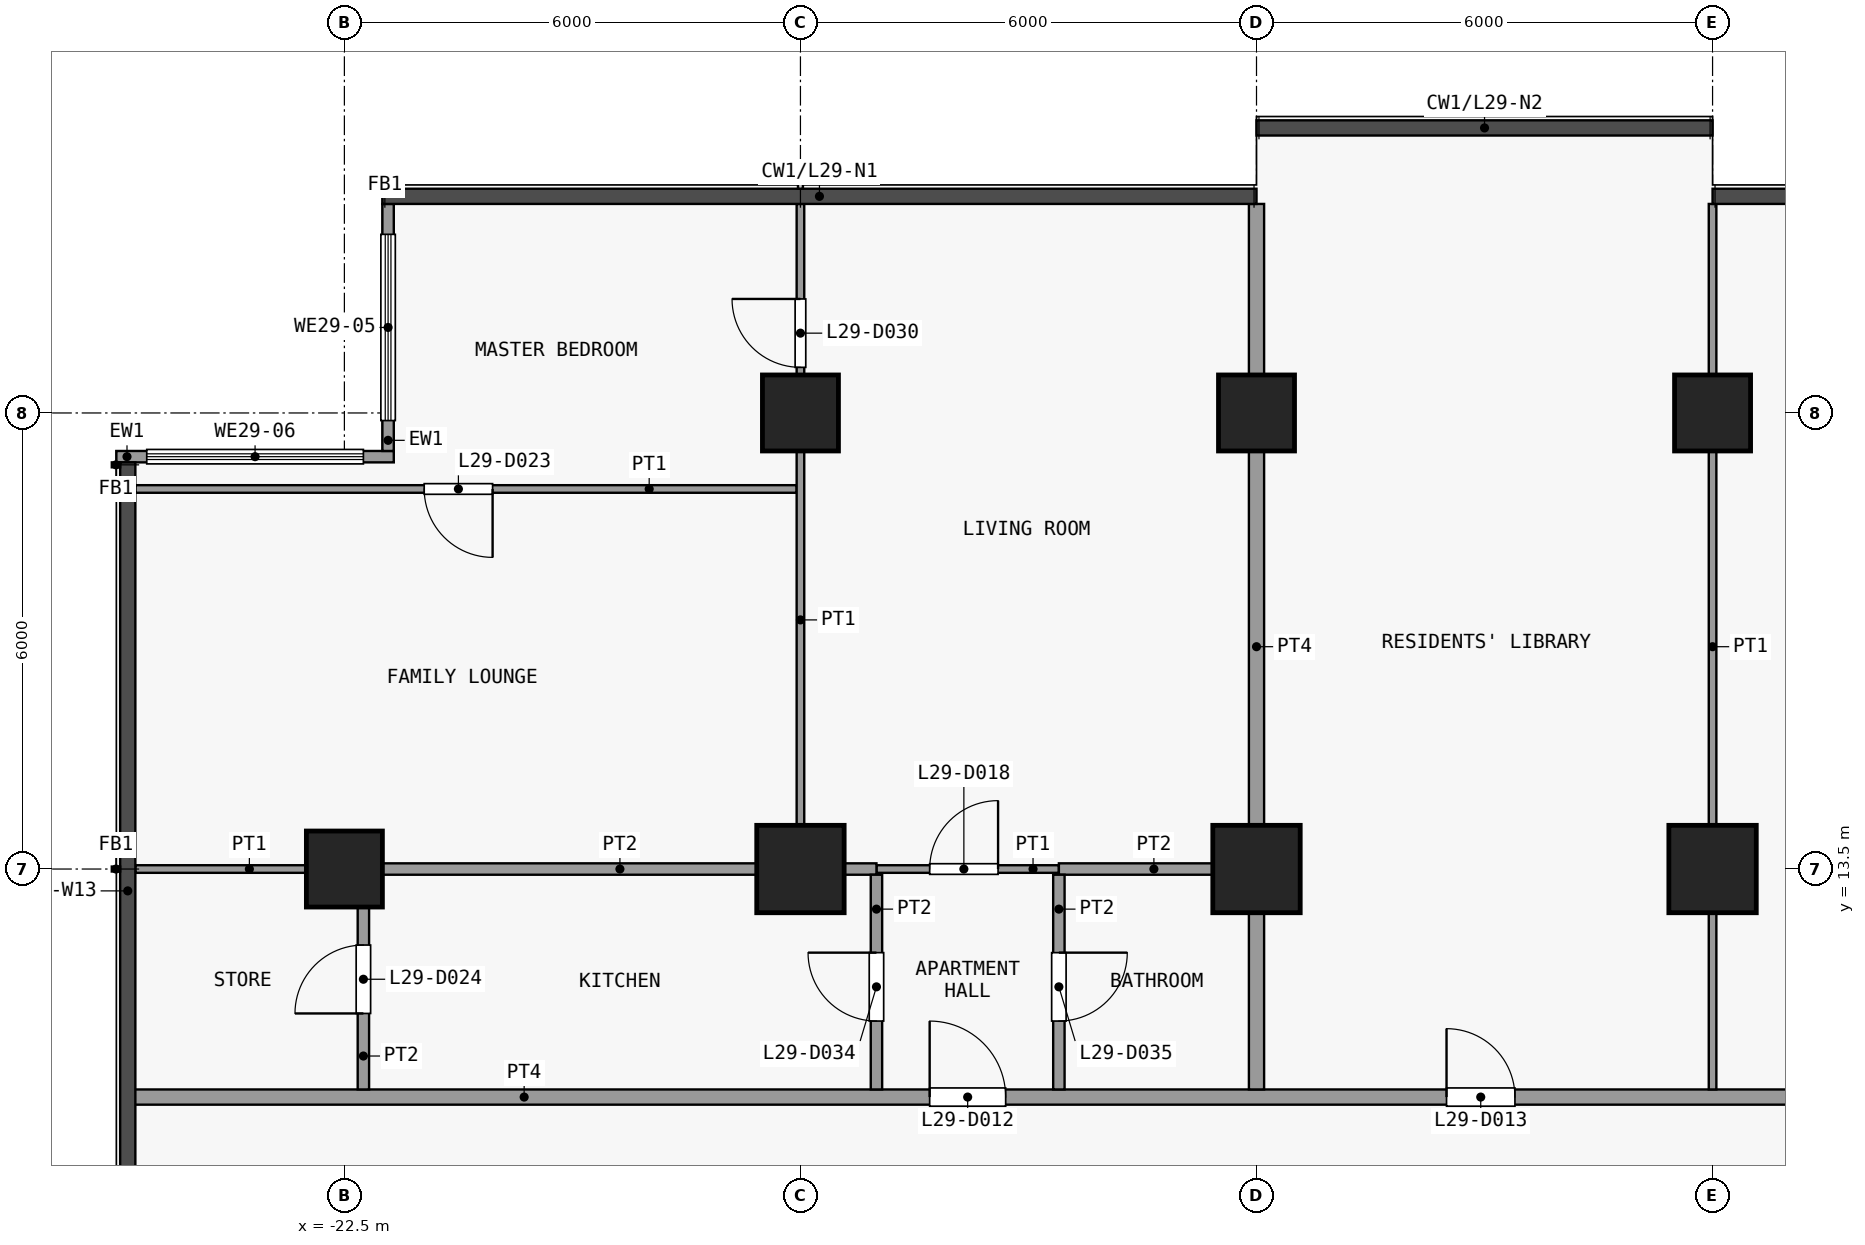
"""IFC4 building model, lengths in metres.
Left out: names, types, materials, properties, quantities, classifications, styles, units other than length and angle.
Written with IfcOpenShell. Run it as: python <this file> out.ifc"""

import sys

from ifc_helpers import new_model, si_unit, direction, frame, frame_2d, origin, origin_2d, place, context, subcontext, project, spatial, rectangle, extrude, element, fill, save


model = new_model("IFC4")
c1 = context("Model", 3, precision=1e-05, world=origin(), true_north=direction((0.0, 1.0)))
c2 = subcontext(c1, "Body", "Model", "MODEL_VIEW")
j1 = project(units=[si_unit("LENGTHUNIT", "METRE"), si_unit("PLANEANGLEUNIT", "RADIAN")], contexts=[c1])
p1 = place(None, origin())
s1 = spatial("IfcSite", under=j1, at=p1, CompositionType="ELEMENT")
p2 = place(p1, origin())
s2 = spatial("IfcBuilding", under=s1, at=p2, CompositionType="ELEMENT")
p3 = place(p2, frame((0.0, 0.0, 117.1)))
s3 = spatial("IfcBuildingStorey", under=s2, at=p3, CompositionType="ELEMENT", Elevation=117.1)
p4 = place(p3, frame((-22.5, 13.5, 0.0), z_axis=(0.0, 0.0, 1.0), x_axis=(1.0, 0.0, 0.0)))
e1 = element("IfcColumn", 1, at=p4, inside=s3, PredefinedType="COLUMN", context=c2, shape_type="SweptSolid", body=[
    extrude(rectangle(XDim=1.0, YDim=1.0, at=origin_2d()), origin(), (0.0, 0.0, 1.0), 3.6),
])
p5 = place(p3, frame((-16.5, 13.5, 0.0), z_axis=(0.0, 0.0, 1.0), x_axis=(1.0, 0.0, 0.0)))
e2 = element("IfcColumn", 2, at=p5, inside=s3, PredefinedType="COLUMN", context=c2, shape_type="SweptSolid", body=[
    extrude(rectangle(XDim=1.15, YDim=1.15, at=origin_2d()), origin(), (0.0, 0.0, 1.0), 3.6),
])
p6 = place(p3, frame((-16.5, 19.5, 0.0), z_axis=(0.0, 0.0, 1.0), x_axis=(1.0, 0.0, 0.0)))
e3 = element("IfcColumn", 3, at=p6, inside=s3, PredefinedType="COLUMN", context=c2, shape_type="SweptSolid", body=[
    extrude(rectangle(XDim=1.0, YDim=1.0, at=origin_2d()), origin(), (0.0, 0.0, 1.0), 3.6),
])
p7 = place(p3, frame((-10.5, 13.5, 0.0), z_axis=(0.0, 0.0, 1.0), x_axis=(1.0, 0.0, 0.0)))
e4 = element("IfcColumn", 4, at=p7, inside=s3, PredefinedType="COLUMN", context=c2, shape_type="SweptSolid", body=[
    extrude(rectangle(XDim=1.15, YDim=1.15, at=origin_2d()), origin(), (0.0, 0.0, 1.0), 3.6),
])
p8 = place(p3, frame((-10.5, 19.5, 0.0), z_axis=(0.0, 0.0, 1.0), x_axis=(1.0, 0.0, 0.0)))
e5 = element("IfcColumn", 5, at=p8, inside=s3, PredefinedType="COLUMN", context=c2, shape_type="SweptSolid", body=[
    extrude(rectangle(XDim=1.0, YDim=1.0, at=origin_2d()), origin(), (0.0, 0.0, 1.0), 3.6),
])
p9 = place(p3, frame((-4.5, 13.5, 0.0), z_axis=(0.0, 0.0, 1.0), x_axis=(1.0, 0.0, 0.0)))
e6 = element("IfcColumn", 6, at=p9, inside=s3, PredefinedType="COLUMN", context=c2, shape_type="SweptSolid", body=[
    extrude(rectangle(XDim=1.15, YDim=1.15, at=origin_2d()), origin(), (0.0, 0.0, 1.0), 3.6),
])
p10 = place(p3, frame((-4.5, 19.5, 0.0), z_axis=(0.0, 0.0, 1.0), x_axis=(1.0, 0.0, 0.0)))
e7 = element("IfcColumn", 7, at=p10, inside=s3, PredefinedType="COLUMN", context=c2, shape_type="SweptSolid", body=[
    extrude(rectangle(XDim=1.0, YDim=1.0, at=origin_2d()), origin(), (0.0, 0.0, 1.0), 3.6),
])
p11 = place(p3, frame((-21.925, 19.0, 0.0), z_axis=(0.0, 0.0, 1.0), x_axis=(0.0, 1.0, 0.0)))
e8 = element("IfcWall", 8, at=p11, inside=s3, PredefinedType="SOLIDWALL", context=c2, shape_type="SweptSolid", body=[
    extrude(rectangle(XDim=3.25, YDim=0.15, at=frame_2d((1.625, 0.0))), origin(), (0.0, 0.0, 1.0), 3.3),
])
p12 = place(p11, frame((0.4, 0.0, 0.9)))
e9 = element("IfcOpeningElement", 9, at=p12, cuts=e8, PredefinedType="OPENING", context=c2, shape_type="SweptSolid", body=[
    extrude(rectangle(XDim=2.45, YDim=2.4, at=frame_2d((1.225, 1.2))), frame((0.0, 0.085, 0.0), z_axis=(0.0, -1.0, 0.0), x_axis=(1.0, 0.0, 0.0)), (0.0, 0.0, 1.0), 0.17),
])
p13 = place(p3, frame((-25.5, 18.925, 0.0), z_axis=(0.0, 0.0, 1.0), x_axis=(1.0, 0.0, 0.0)))
e10 = element("IfcWall", 10, at=p13, inside=s3, PredefinedType="SOLIDWALL", context=c2, shape_type="SweptSolid", body=[
    extrude(rectangle(XDim=3.65, YDim=0.15, at=frame_2d((1.825, 0.0))), origin(), (0.0, 0.0, 1.0), 3.3),
])
p14 = place(p13, frame((0.4, 0.0, 0.9)))
e11 = element("IfcOpeningElement", 11, at=p14, cuts=e10, PredefinedType="OPENING", context=c2, shape_type="SweptSolid", body=[
    extrude(rectangle(XDim=2.85, YDim=2.4, at=frame_2d((1.425, 1.2))), frame((0.0, 0.085, 0.0), z_axis=(0.0, -1.0, 0.0), x_axis=(1.0, 0.0, 0.0)), (0.0, 0.0, 1.0), 0.17),
])
p15 = place(p3, frame((-25.35, 10.5, 0.0), z_axis=(0.0, 0.0, 1.0), x_axis=(1.0, 0.0, 0.0)))
e12 = element("IfcWall", 12, at=p15, inside=s3, PredefinedType="PARTITIONING", context=c2, shape_type="SweptSolid", body=[
    extrude(rectangle(XDim=50.7, YDim=0.2, at=frame_2d((25.35, 0.0))), origin(), (0.0, 0.0, 1.0), 3.3),
])
p16 = place(p15, frame((10.55, 0.0, 0.0)))
e13 = element("IfcOpeningElement", 13, at=p16, cuts=e12, PredefinedType="OPENING", context=c2, shape_type="SweptSolid", body=[
    extrude(rectangle(XDim=1.0, YDim=2.1, at=frame_2d((0.5, 1.05))), frame((0.0, 0.11, 0.0), z_axis=(0.0, -1.0, 0.0), x_axis=(1.0, 0.0, 0.0)), (0.0, 0.0, 1.0), 0.22),
])
p17 = place(p15, frame((17.35, 0.0, 0.0)))
e14 = element("IfcOpeningElement", 14, at=p17, cuts=e12, PredefinedType="OPENING", context=c2, shape_type="SweptSolid", body=[
    extrude(rectangle(XDim=0.9, YDim=2.1, at=frame_2d((0.45, 1.05))), frame((0.0, 0.11, 0.0), z_axis=(0.0, -1.0, 0.0), x_axis=(1.0, 0.0, 0.0)), (0.0, 0.0, 1.0), 0.22),
])
p18 = place(p15, frame((24.85, 0.0, 0.0)))
e15 = element("IfcOpeningElement", 15, at=p18, cuts=e12, PredefinedType="OPENING", context=c2, shape_type="SweptSolid", body=[
    extrude(rectangle(XDim=0.9, YDim=2.1, at=frame_2d((0.45, 1.05))), frame((0.0, 0.11, 0.0), z_axis=(0.0, -1.0, 0.0), x_axis=(1.0, 0.0, 0.0)), (0.0, 0.0, 1.0), 0.22),
])
p19 = place(p15, frame((32.35, 0.0, 0.0)))
e16 = element("IfcOpeningElement", 16, at=p19, cuts=e12, PredefinedType="OPENING", context=c2, shape_type="SweptSolid", body=[
    extrude(rectangle(XDim=0.9, YDim=2.1, at=frame_2d((0.45, 1.05))), frame((0.0, 0.11, 0.0), z_axis=(0.0, -1.0, 0.0), x_axis=(1.0, 0.0, 0.0)), (0.0, 0.0, 1.0), 0.22),
])
p20 = place(p15, frame((36.55, 0.0, 0.0)))
e17 = element("IfcOpeningElement", 17, at=p20, cuts=e12, PredefinedType="OPENING", context=c2, shape_type="SweptSolid", body=[
    extrude(rectangle(XDim=1.0, YDim=2.1, at=frame_2d((0.5, 1.05))), frame((0.0, 0.11, 0.0), z_axis=(0.0, -1.0, 0.0), x_axis=(1.0, 0.0, 0.0)), (0.0, 0.0, 1.0), 0.22),
])
p21 = place(p15, frame((45.05, 0.0, 0.0)))
e18 = element("IfcOpeningElement", 18, at=p21, cuts=e12, PredefinedType="OPENING", context=c2, shape_type="SweptSolid", body=[
    extrude(rectangle(XDim=1.0, YDim=2.1, at=frame_2d((0.5, 1.05))), frame((0.0, 0.11, 0.0), z_axis=(0.0, -1.0, 0.0), x_axis=(1.0, 0.0, 0.0)), (0.0, 0.0, 1.0), 0.22),
])
p22 = place(p3, frame((-25.25, 13.5, 0.0), z_axis=(0.0, 0.0, 1.0), x_axis=(1.0, 0.0, 0.0)))
e19 = element("IfcWall", 19, at=p22, inside=s3, PredefinedType="PARTITIONING", context=c2, shape_type="SweptSolid", body=[
    extrude(rectangle(XDim=3.0, YDim=0.1, at=frame_2d((1.5, 0.0))), origin(), (0.0, 0.0, 1.0), 3.3),
])
p23 = place(p3, frame((-15.5, 13.5, 0.0), z_axis=(0.0, 0.0, 1.0), x_axis=(1.0, 0.0, 0.0)))
e20 = element("IfcWall", 20, at=p23, inside=s3, PredefinedType="PARTITIONING", context=c2, shape_type="SweptSolid", body=[
    extrude(rectangle(XDim=2.4, YDim=0.1, at=frame_2d((1.2, 0.0))), origin(), (0.0, 0.0, 1.0), 3.3),
])
p24 = place(p23, frame((0.7, 0.0, 0.0)))
e21 = element("IfcOpeningElement", 21, at=p24, cuts=e20, PredefinedType="OPENING", context=c2, shape_type="SweptSolid", body=[
    extrude(rectangle(XDim=0.9, YDim=2.1, at=frame_2d((0.45, 1.05))), frame((0.0, 0.06, 0.0), z_axis=(0.0, -1.0, 0.0), x_axis=(1.0, 0.0, 0.0)), (0.0, 0.0, 1.0), 0.12),
])
p25 = place(p3, frame((-22.25, 13.5, 0.0), z_axis=(0.0, 0.0, 1.0), x_axis=(1.0, 0.0, 0.0)))
e22 = element("IfcWall", 22, at=p25, inside=s3, PredefinedType="PARTITIONING", context=c2, shape_type="SweptSolid", body=[
    extrude(rectangle(XDim=6.75, YDim=0.15, at=frame_2d((3.375, 0.0))), origin(), (0.0, 0.0, 1.0), 3.3),
])
p26 = place(p3, frame((-13.1, 13.5, 0.0), z_axis=(0.0, 0.0, 1.0), x_axis=(1.0, 0.0, 0.0)))
e23 = element("IfcWall", 23, at=p26, inside=s3, PredefinedType="PARTITIONING", context=c2, shape_type="SweptSolid", body=[
    extrude(rectangle(XDim=2.5, YDim=0.15, at=frame_2d((1.25, 0.0))), origin(), (0.0, 0.0, 1.0), 3.3),
])
p27 = place(p3, frame((-25.25, 18.5, 0.0), z_axis=(0.0, 0.0, 1.0), x_axis=(1.0, 0.0, 0.0)))
e24 = element("IfcWall", 24, at=p27, inside=s3, PredefinedType="PARTITIONING", context=c2, shape_type="SweptSolid", body=[
    extrude(rectangle(XDim=8.7, YDim=0.1, at=frame_2d((4.35, 0.0))), origin(), (0.0, 0.0, 1.0), 3.3),
])
p28 = place(p27, frame((3.8, 0.0, 0.0)))
e25 = element("IfcOpeningElement", 25, at=p28, cuts=e24, PredefinedType="OPENING", context=c2, shape_type="SweptSolid", body=[
    extrude(rectangle(XDim=0.9, YDim=2.1, at=frame_2d((0.45, 1.05))), frame((0.0, 0.06, 0.0), z_axis=(0.0, -1.0, 0.0), x_axis=(1.0, 0.0, 0.0)), (0.0, 0.0, 1.0), 0.12),
])
p29 = place(p3, frame((-22.25, 10.6, 0.0), z_axis=(0.0, 0.0, 1.0), x_axis=(0.0, 1.0, 0.0)))
e26 = element("IfcWall", 26, at=p29, inside=s3, PredefinedType="PARTITIONING", context=c2, shape_type="SweptSolid", body=[
    extrude(rectangle(XDim=2.825, YDim=0.15, at=frame_2d((1.413, 0.0))), origin(), (0.0, 0.0, 1.0), 3.3),
])
p30 = place(p29, frame((1.0, 0.0, 0.0)))
e27 = element("IfcOpeningElement", 27, at=p30, cuts=e26, PredefinedType="OPENING", context=c2, shape_type="SweptSolid", body=[
    extrude(rectangle(XDim=0.9, YDim=2.1, at=frame_2d((0.45, 1.05))), frame((0.0, 0.085, 0.0), z_axis=(0.0, -1.0, 0.0), x_axis=(1.0, 0.0, 0.0)), (0.0, 0.0, 1.0), 0.17),
])
p31 = place(p3, frame((-16.5, 13.575, 0.0), z_axis=(0.0, 0.0, 1.0), x_axis=(0.0, 1.0, 0.0)))
e28 = element("IfcWall", 28, at=p31, inside=s3, PredefinedType="PARTITIONING", context=c2, shape_type="SweptSolid", body=[
    extrude(rectangle(XDim=8.675, YDim=0.1, at=frame_2d((4.337, 0.0))), origin(), (0.0, 0.0, 1.0), 3.3),
])
p32 = place(p31, frame((6.525, 0.0, 0.0)))
e29 = element("IfcOpeningElement", 29, at=p32, cuts=e28, PredefinedType="OPENING", context=c2, shape_type="SweptSolid", body=[
    extrude(rectangle(XDim=0.9, YDim=2.1, at=frame_2d((0.45, 1.05))), frame((0.0, 0.06, 0.0), z_axis=(0.0, -1.0, 0.0), x_axis=(1.0, 0.0, 0.0)), (0.0, 0.0, 1.0), 0.12),
])
p33 = place(p3, frame((-15.5, 10.6, 0.0), z_axis=(0.0, 0.0, 1.0), x_axis=(0.0, 1.0, 0.0)))
e30 = element("IfcWall", 30, at=p33, inside=s3, PredefinedType="PARTITIONING", context=c2, shape_type="SweptSolid", body=[
    extrude(rectangle(XDim=2.825, YDim=0.15, at=frame_2d((1.413, 0.0))), origin(), (0.0, 0.0, 1.0), 3.3),
])
p34 = place(p33, frame((0.9, 0.0, 0.0)))
e31 = element("IfcOpeningElement", 31, at=p34, cuts=e30, PredefinedType="OPENING", context=c2, shape_type="SweptSolid", body=[
    extrude(rectangle(XDim=0.9, YDim=2.1, at=frame_2d((0.45, 1.05))), frame((0.0, 0.085, 0.0), z_axis=(0.0, -1.0, 0.0), x_axis=(1.0, 0.0, 0.0)), (0.0, 0.0, 1.0), 0.17),
])
p35 = place(p3, frame((-13.1, 10.6, 0.0), z_axis=(0.0, 0.0, 1.0), x_axis=(0.0, 1.0, 0.0)))
e32 = element("IfcWall", 32, at=p35, inside=s3, PredefinedType="PARTITIONING", context=c2, shape_type="SweptSolid", body=[
    extrude(rectangle(XDim=2.825, YDim=0.15, at=frame_2d((1.413, 0.0))), origin(), (0.0, 0.0, 1.0), 3.3),
])
p36 = place(p35, frame((0.9, 0.0, 0.0)))
e33 = element("IfcOpeningElement", 33, at=p36, cuts=e32, PredefinedType="OPENING", context=c2, shape_type="SweptSolid", body=[
    extrude(rectangle(XDim=0.9, YDim=2.1, at=frame_2d((0.45, 1.05))), frame((0.0, 0.085, 0.0), z_axis=(0.0, -1.0, 0.0), x_axis=(1.0, 0.0, 0.0)), (0.0, 0.0, 1.0), 0.17),
])
p37 = place(p3, frame((-10.5, 10.6, 0.0), z_axis=(0.0, 0.0, 1.0), x_axis=(0.0, 1.0, 0.0)))
e34 = element("IfcWall", 34, at=p37, inside=s3, PredefinedType="PARTITIONING", context=c2, shape_type="SweptSolid", body=[
    extrude(rectangle(XDim=11.65, YDim=0.2, at=frame_2d((5.825, 0.0))), origin(), (0.0, 0.0, 1.0), 3.3),
])
p38 = place(p3, frame((-4.5, 10.6, 0.0), z_axis=(0.0, 0.0, 1.0), x_axis=(0.0, 1.0, 0.0)))
e35 = element("IfcWall", 35, at=p38, inside=s3, PredefinedType="PARTITIONING", context=c2, shape_type="SweptSolid", body=[
    extrude(rectangle(XDim=11.65, YDim=0.1, at=frame_2d((5.825, 0.0))), origin(), (0.0, 0.0, 1.0), 3.3),
])
p39 = place(p12, origin())
e36 = element("IfcWindow", 36, at=p39, inside=s3, PartitioningType="SINGLE_PANEL", PredefinedType="WINDOW", context=c2, shape_type="SweptSolid", body=[
    extrude(rectangle(XDim=2.45, YDim=2.4, at=frame_2d((1.225, 1.2))), frame((0.0, 0.03, 0.0), z_axis=(0.0, -1.0, 0.0), x_axis=(1.0, 0.0, 0.0)), (0.0, 0.0, 1.0), 0.06),
])
fill(e9, e36)
p40 = place(p14, origin())
e37 = element("IfcWindow", 37, at=p40, inside=s3, PartitioningType="SINGLE_PANEL", PredefinedType="WINDOW", context=c2, shape_type="SweptSolid", body=[
    extrude(rectangle(XDim=2.85, YDim=2.4, at=frame_2d((1.425, 1.2))), frame((0.0, 0.03, 0.0), z_axis=(0.0, -1.0, 0.0), x_axis=(1.0, 0.0, 0.0)), (0.0, 0.0, 1.0), 0.06),
])
fill(e11, e37)
p41 = place(p16, origin())
e38 = element("IfcDoor", 38, at=p41, inside=s3, OperationType="SINGLE_SWING_RIGHT", PredefinedType="DOOR", context=c2, shape_type="SweptSolid", body=[
    extrude(rectangle(XDim=1.0, YDim=2.1, at=frame_2d((0.5, 1.05))), frame((0.0, 0.025, 0.0), z_axis=(0.0, -1.0, 0.0), x_axis=(1.0, 0.0, 0.0)), (0.0, 0.0, 1.0), 0.05),
])
fill(e13, e38)
p42 = place(p17, origin())
e39 = element("IfcDoor", 39, at=p42, inside=s3, OperationType="SINGLE_SWING_RIGHT", PredefinedType="DOOR", context=c2, shape_type="SweptSolid", body=[
    extrude(rectangle(XDim=0.9, YDim=2.1, at=frame_2d((0.45, 1.05))), frame((0.0, 0.025, 0.0), z_axis=(0.0, -1.0, 0.0), x_axis=(1.0, 0.0, 0.0)), (0.0, 0.0, 1.0), 0.05),
])
fill(e14, e39)
p43 = place(p24, origin())
e40 = element("IfcDoor", 40, at=p43, inside=s3, OperationType="SINGLE_SWING_LEFT", PredefinedType="DOOR", context=c2, shape_type="SweptSolid", body=[
    extrude(rectangle(XDim=0.9, YDim=2.1, at=frame_2d((0.45, 1.05))), frame((0.0, 0.025, 0.0), z_axis=(0.0, -1.0, 0.0), x_axis=(1.0, 0.0, 0.0)), (0.0, 0.0, 1.0), 0.05),
])
fill(e21, e40)
p44 = place(p28, origin())
e41 = element("IfcDoor", 41, at=p44, inside=s3, OperationType="SINGLE_SWING_RIGHT", PredefinedType="DOOR", context=c2, shape_type="SweptSolid", body=[
    extrude(rectangle(XDim=0.9, YDim=2.1, at=frame_2d((0.45, 1.05))), frame((0.0, 0.025, 0.0), z_axis=(0.0, -1.0, 0.0), x_axis=(1.0, 0.0, 0.0)), (0.0, 0.0, 1.0), 0.05),
])
fill(e25, e41)
p45 = place(p30, origin())
e42 = element("IfcDoor", 42, at=p45, inside=s3, OperationType="SINGLE_SWING_RIGHT", PredefinedType="DOOR", context=c2, shape_type="SweptSolid", body=[
    extrude(rectangle(XDim=0.9, YDim=2.1, at=frame_2d((0.45, 1.05))), frame((0.0, 0.025, 0.0), z_axis=(0.0, -1.0, 0.0), x_axis=(1.0, 0.0, 0.0)), (0.0, 0.0, 1.0), 0.05),
])
fill(e27, e42)
p46 = place(p32, origin())
e43 = element("IfcDoor", 43, at=p46, inside=s3, OperationType="SINGLE_SWING_LEFT", PredefinedType="DOOR", context=c2, shape_type="SweptSolid", body=[
    extrude(rectangle(XDim=0.9, YDim=2.1, at=frame_2d((0.45, 1.05))), frame((0.0, 0.025, 0.0), z_axis=(0.0, -1.0, 0.0), x_axis=(1.0, 0.0, 0.0)), (0.0, 0.0, 1.0), 0.05),
])
fill(e29, e43)
p47 = place(p34, origin())
e44 = element("IfcDoor", 44, at=p47, inside=s3, OperationType="SINGLE_SWING_LEFT", PredefinedType="DOOR", context=c2, shape_type="SweptSolid", body=[
    extrude(rectangle(XDim=0.9, YDim=2.1, at=frame_2d((0.45, 1.05))), frame((0.0, 0.025, 0.0), z_axis=(0.0, -1.0, 0.0), x_axis=(1.0, 0.0, 0.0)), (0.0, 0.0, 1.0), 0.05),
])
fill(e31, e44)
p48 = place(p36, origin())
e45 = element("IfcDoor", 45, at=p48, inside=s3, OperationType="SINGLE_SWING_RIGHT", PredefinedType="DOOR", context=c2, shape_type="SweptSolid", body=[
    extrude(rectangle(XDim=0.9, YDim=2.1, at=frame_2d((0.45, 1.05))), frame((0.0, 0.025, 0.0), z_axis=(0.0, -1.0, 0.0), x_axis=(1.0, 0.0, 0.0)), (0.0, 0.0, 1.0), 0.05),
])
fill(e33, e45)
save(model, sys.argv[1])
